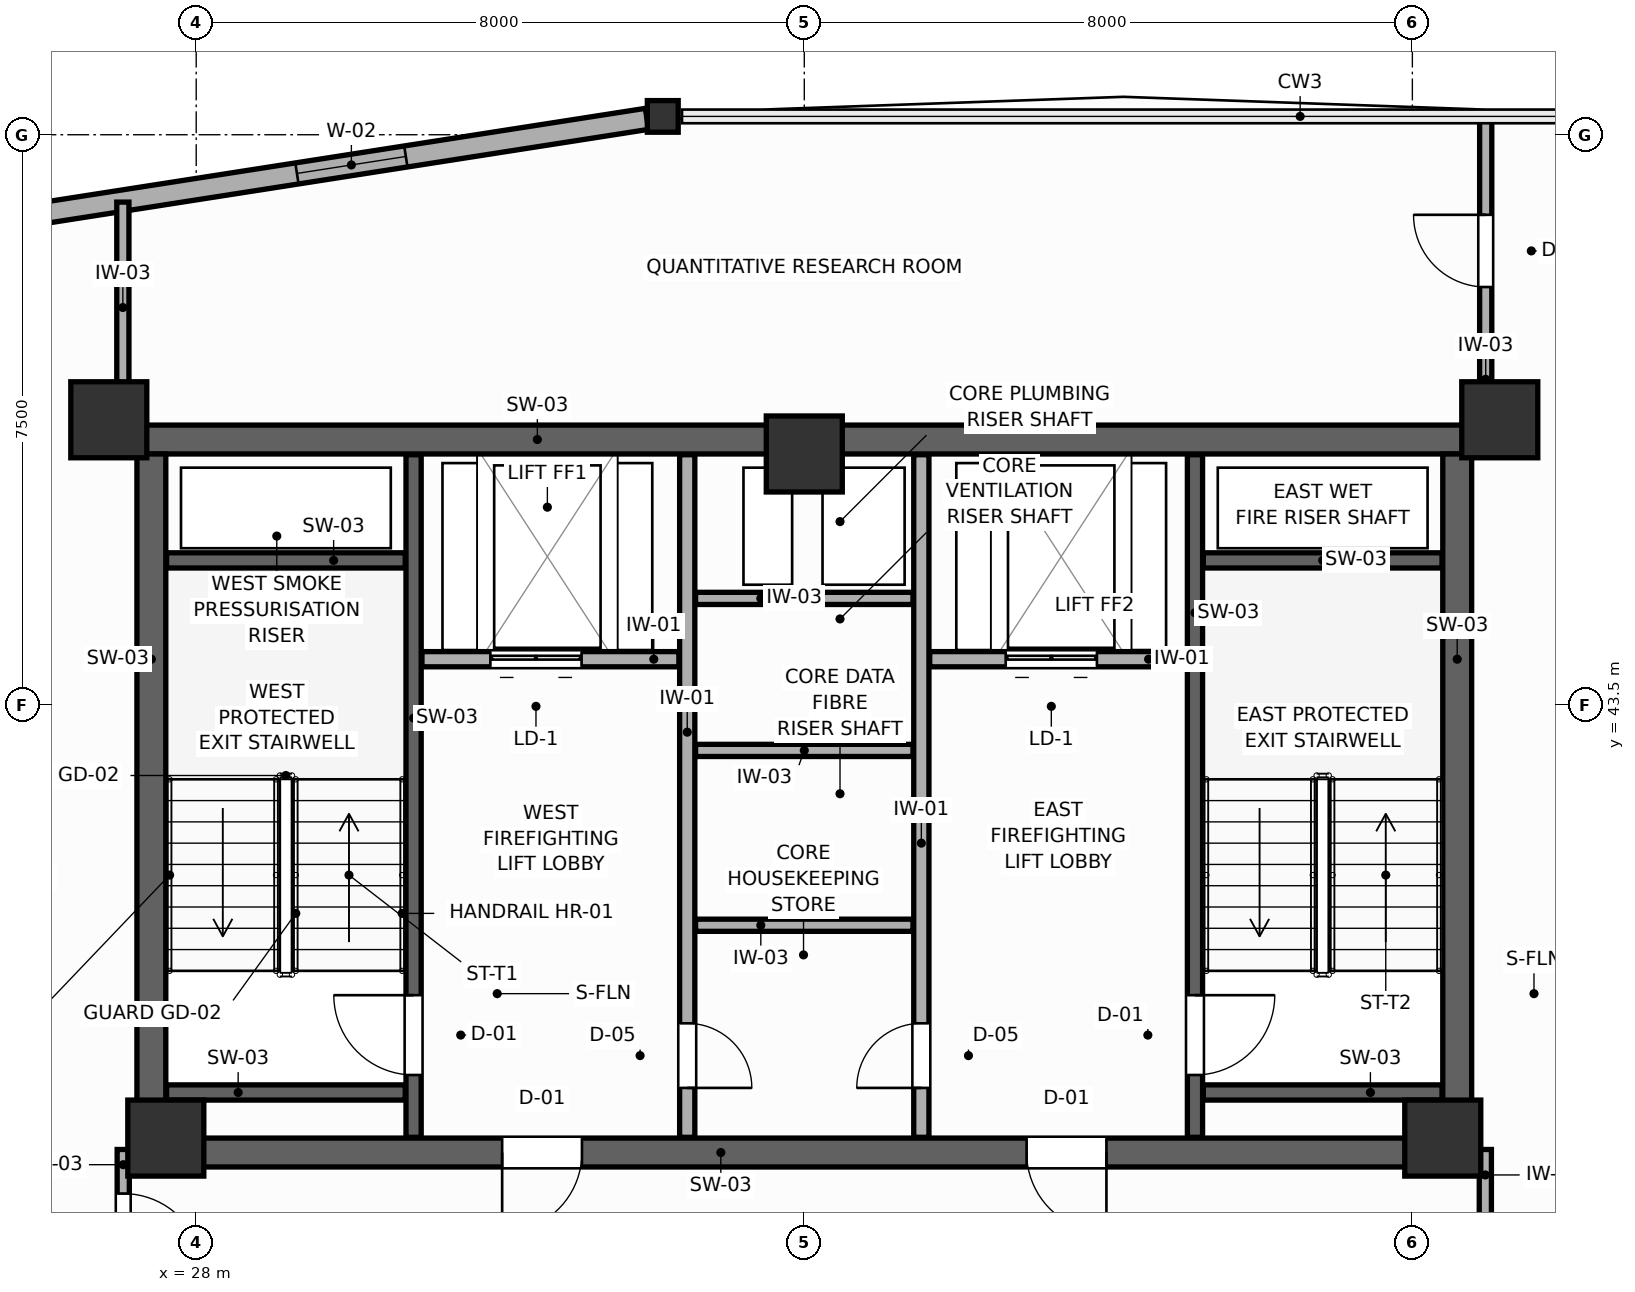
"""IFC4 building model, lengths in metres.
Left out: names, types, materials, properties, quantities, classifications, styles, units other than length and angle.
Written with IfcOpenShell. Run it as: python <this file> out.ifc"""

import sys

from ifc_helpers import new_model, si_unit, direction, frame, frame_2d, origin, origin_2d, place, context, subcontext, project, spatial, rectangle, i_section, extrude, source, transform, mapped, element, fill, save


model = new_model("IFC4")
c1 = context("Model", 3, precision=1e-05, world=origin(), true_north=direction((0.0, 1.0)))
c2 = subcontext(c1, "Body", "Model", "MODEL_VIEW")
j1 = project(units=[si_unit("LENGTHUNIT", "METRE"), si_unit("PLANEANGLEUNIT", "RADIAN")], contexts=[c1])
p1 = place(None, origin())
s1 = spatial("IfcSite", under=j1, at=p1, CompositionType="ELEMENT")
p2 = place(p1, origin())
s2 = spatial("IfcBuilding", under=s1, at=p2, CompositionType="ELEMENT")
p3 = place(p2, frame((0.0, 0.0, 234.6)))
s3 = spatial("IfcBuildingStorey", under=s2, at=p3, CompositionType="ELEMENT", Elevation=234.6)
p4 = place(p3, frame((27.22, 46.99, 0.0), z_axis=(0.0, 0.0, 1.0), x_axis=(1.0, 0.0, 0.0)))
e1 = element("IfcWall", 1, at=p4, inside=s3, PredefinedType="SHEAR", context=c2, shape_type="SweptSolid", body=[
    extrude(rectangle(XDim=17.56, YDim=0.38, at=frame_2d((8.78, 0.0))), origin(), (0.0, 0.0, 1.0), 3.6),
])
p5 = place(p3, frame((27.22, 37.61, 0.0), z_axis=(0.0, 0.0, 1.0), x_axis=(1.0, 0.0, 0.0)))
e2 = element("IfcWall", 2, at=p5, inside=s3, PredefinedType="SHEAR", context=c2, shape_type="SweptSolid", body=[
    extrude(rectangle(XDim=17.56, YDim=0.38, at=frame_2d((8.78, 0.0))), origin(), (0.0, 0.0, 1.0), 3.6),
])
p6 = place(p5, frame((4.805, 0.0, 0.0)))
e3 = element("IfcOpeningElement", 3, at=p6, cuts=e2, PredefinedType="OPENING", context=c2, shape_type="SweptSolid", body=[
    extrude(rectangle(XDim=1.05, YDim=2.1, at=frame_2d((0.525, 1.05))), frame((0.0, 0.2, 0.0), z_axis=(0.0, -1.0, 0.0), x_axis=(1.0, 0.0, 0.0)), (0.0, 0.0, 1.0), 0.4),
])
p7 = place(p5, frame((11.705, 0.0, 0.0)))
e4 = element("IfcOpeningElement", 4, at=p7, cuts=e2, PredefinedType="OPENING", context=c2, shape_type="SweptSolid", body=[
    extrude(rectangle(XDim=1.05, YDim=2.1, at=frame_2d((0.525, 1.05))), frame((0.0, 0.2, 0.0), z_axis=(0.0, -1.0, 0.0), x_axis=(1.0, 0.0, 0.0)), (0.0, 0.0, 1.0), 0.4),
])
for number, where, z_axis, x_axis in (
    (5, (27.41, 37.8, 0.0), (0.0, 0.0, 1.0), (0.0, 1.0, 0.0)),
    (6, (44.59, 37.8, 0.0), (0.0, 0.0, 1.0), (0.0, 1.0, 0.0)),
):
    element("IfcWall", number, at=place(p3, frame(where, z_axis=z_axis, x_axis=x_axis)), inside=s3, PredefinedType="SHEAR", context=c2, shape_type="SweptSolid", body=[
        extrude(rectangle(XDim=9.0, YDim=0.38, at=frame_2d((4.5, 0.0))), origin(), (0.0, 0.0, 1.0), 3.6),
    ])
m1 = source(origin(), c2, "Body", "SweptSolid", [
    extrude(rectangle(XDim=1.0, YDim=1.0, at=origin_2d()), origin(), (0.0, 0.0, 1.0), 3.6),
])
for number, where, z_axis, x_axis in (
    (7, (26.85, 47.25, 0.0), (0.0, 0.0, 1.0), (1.0, 0.0, 0.0)),
    (8, (45.15, 47.25, 0.0), (0.0, 0.0, 1.0), (1.0, 0.0, 0.0)),
    (9, (27.6, 37.8, 0.0), (0.0, 0.0, 1.0), (1.0, 0.0, 0.0)),
    (10, (44.4, 37.8, 0.0), (0.0, 0.0, 1.0), (1.0, 0.0, 0.0)),
    (11, (36.0, 46.8, 0.0), (0.0, 0.0, 1.0), (1.0, 0.0, 0.0)),
):
    element("IfcColumn", number, at=place(p3, frame(where, z_axis=z_axis, x_axis=x_axis)), inside=s3, PredefinedType="COLUMN", context=c2, shape_type="MappedRepresentation", body=[
        mapped(m1, transform((0.0, 0.0, 0.0), scale=1.0)),
    ])
m2 = source(origin(), c2, "Body", "SweptSolid", [
    extrude(i_section(OverallWidth=0.406, OverallDepth=0.416, WebThickness=0.027, FlangeThickness=0.044, FilletRadius=0.015, at=origin_2d()), origin(), (0.0, 0.0, 1.0), 3.6),
])
p8 = place(p3, frame((34.138, 51.241, 0.0), z_axis=(0.0, 0.0, 1.0), x_axis=(1.0, 0.0, 0.0)))
e12 = element("IfcColumn", 12, at=p8, inside=s3, PredefinedType="COLUMN", context=c2, shape_type="MappedRepresentation", body=[
    mapped(m2, transform((0.0, 0.0, 0.0), scale=1.0)),
])
p9 = place(p3, frame((33.93, 51.209, 0.0), z_axis=(0.0, 0.0, 1.0), x_axis=(-0.988058563106, -0.154078797613, 0.0)))
e13 = element("IfcWall", 13, at=p9, inside=s3, PredefinedType="SOLIDWALL", context=c2, shape_type="SweptSolid", body=[
    extrude(rectangle(XDim=13.492, YDim=0.28, at=frame_2d((6.746, 0.0))), origin(), (0.0, 0.0, 1.0), 2.81),
])
p10 = place(p9, frame((3.211, 0.0, 0.75)))
e14 = element("IfcOpeningElement", 14, at=p10, cuts=e13, PredefinedType="OPENING", context=c2, shape_type="SweptSolid", body=[
    extrude(rectangle(XDim=1.45, YDim=1.65, at=frame_2d((0.725, 0.825))), frame((0.0, 0.15, 0.0), z_axis=(0.0, -1.0, 0.0), x_axis=(1.0, 0.0, 0.0)), (0.0, 0.0, 1.0), 0.3),
])
p11 = place(p3, frame((30.86, 37.81, 0.0), z_axis=(0.0, 0.0, 1.0), x_axis=(0.0, 1.0, 0.0)))
e15 = element("IfcWall", 15, at=p11, inside=s3, PredefinedType="SHEAR", context=c2, shape_type="SweptSolid", body=[
    extrude(rectangle(XDim=8.98, YDim=0.2, at=frame_2d((4.49, 0.0))), origin(), (0.0, 0.0, 1.0), 3.6),
])
p12 = place(p11, frame((0.82, 0.0, 0.0)))
e16 = element("IfcOpeningElement", 16, at=p12, cuts=e15, PredefinedType="OPENING", context=c2, shape_type="SweptSolid", body=[
    extrude(rectangle(XDim=1.05, YDim=2.1, at=frame_2d((0.525, 1.05))), frame((0.0, 0.11, 0.0), z_axis=(0.0, -1.0, 0.0), x_axis=(1.0, 0.0, 0.0)), (0.0, 0.0, 1.0), 0.22),
])
for number, where, z_axis, x_axis in (
    (17, (27.61, 45.4, 0.0), (0.0, 0.0, 1.0), (1.0, 0.0, 0.0)),
    (18, (27.61, 38.4, 0.0), (0.0, 0.0, 1.0), (1.0, 0.0, 0.0)),
):
    element("IfcWall", number, at=place(p3, frame(where, z_axis=z_axis, x_axis=x_axis)), inside=s3, PredefinedType="SHEAR", context=c2, shape_type="SweptSolid", body=[
        extrude(rectangle(XDim=3.14, YDim=0.2, at=frame_2d((1.57, 0.0))), origin(), (0.0, 0.0, 1.0), 3.6),
    ])
p13 = place(p3, frame((41.14, 37.81, 0.0), z_axis=(0.0, 0.0, 1.0), x_axis=(0.0, 1.0, 0.0)))
e19 = element("IfcWall", 19, at=p13, inside=s3, PredefinedType="SHEAR", context=c2, shape_type="SweptSolid", body=[
    extrude(rectangle(XDim=8.98, YDim=0.2, at=frame_2d((4.49, 0.0))), origin(), (0.0, 0.0, 1.0), 3.6),
])
p14 = place(p13, frame((0.82, 0.0, 0.0)))
e20 = element("IfcOpeningElement", 20, at=p14, cuts=e19, PredefinedType="OPENING", context=c2, shape_type="SweptSolid", body=[
    extrude(rectangle(XDim=1.05, YDim=2.1, at=frame_2d((0.525, 1.05))), frame((0.0, 0.11, 0.0), z_axis=(0.0, -1.0, 0.0), x_axis=(1.0, 0.0, 0.0)), (0.0, 0.0, 1.0), 0.22),
])
for number, where, z_axis, x_axis in (
    (21, (41.25, 45.4, 0.0), (0.0, 0.0, 1.0), (1.0, 0.0, 0.0)),
    (22, (41.25, 38.4, 0.0), (0.0, 0.0, 1.0), (1.0, 0.0, 0.0)),
):
    element("IfcWall", number, at=place(p3, frame(where, z_axis=z_axis, x_axis=x_axis)), inside=s3, PredefinedType="SHEAR", context=c2, shape_type="SweptSolid", body=[
        extrude(rectangle(XDim=3.14, YDim=0.2, at=frame_2d((1.57, 0.0))), origin(), (0.0, 0.0, 1.0), 3.6),
    ])
p15 = place(p3, frame((30.97, 44.1, 0.0), z_axis=(0.0, 0.0, 1.0), x_axis=(1.0, 0.0, 0.0)))
e23 = element("IfcWall", 23, at=p15, inside=s3, PredefinedType="PARTITIONING", context=c2, shape_type="SweptSolid", body=[
    extrude(rectangle(XDim=3.38, YDim=0.2, at=frame_2d((1.69, 0.0))), origin(), (0.0, 0.0, 1.0), 3.26),
])
p16 = place(p15, frame((0.9, 0.0, 0.0)))
e24 = element("IfcOpeningElement", 24, at=p16, cuts=e23, PredefinedType="OPENING", context=c2, shape_type="SweptSolid", body=[
    extrude(rectangle(XDim=1.2, YDim=2.1, at=frame_2d((0.6, 1.05))), frame((0.0, 0.11, 0.0), z_axis=(0.0, -1.0, 0.0), x_axis=(1.0, 0.0, 0.0)), (0.0, 0.0, 1.0), 0.22),
])
p17 = place(p3, frame((37.65, 44.1, 0.0), z_axis=(0.0, 0.0, 1.0), x_axis=(1.0, 0.0, 0.0)))
e25 = element("IfcWall", 25, at=p17, inside=s3, PredefinedType="PARTITIONING", context=c2, shape_type="SweptSolid", body=[
    extrude(rectangle(XDim=3.38, YDim=0.2, at=frame_2d((1.69, 0.0))), origin(), (0.0, 0.0, 1.0), 3.26),
])
p18 = place(p17, frame((1.0, 0.0, 0.0)))
e26 = element("IfcOpeningElement", 26, at=p18, cuts=e25, PredefinedType="OPENING", context=c2, shape_type="SweptSolid", body=[
    extrude(rectangle(XDim=1.2, YDim=2.1, at=frame_2d((0.6, 1.05))), frame((0.0, 0.11, 0.0), z_axis=(0.0, -1.0, 0.0), x_axis=(1.0, 0.0, 0.0)), (0.0, 0.0, 1.0), 0.22),
])
p19 = place(p3, frame((34.46, 37.81, 0.0), z_axis=(0.0, 0.0, 1.0), x_axis=(0.0, 1.0, 0.0)))
e27 = element("IfcWall", 27, at=p19, inside=s3, PredefinedType="PARTITIONING", context=c2, shape_type="SweptSolid", body=[
    extrude(rectangle(XDim=8.98, YDim=0.2, at=frame_2d((4.49, 0.0))), origin(), (0.0, 0.0, 1.0), 3.26),
])
p20 = place(p19, frame((0.65, 0.0, 0.0)))
e28 = element("IfcOpeningElement", 28, at=p20, cuts=e27, PredefinedType="OPENING", context=c2, shape_type="SweptSolid", body=[
    extrude(rectangle(XDim=0.85, YDim=2.05, at=frame_2d((0.425, 1.025))), frame((0.0, 0.11, 0.0), z_axis=(0.0, -1.0, 0.0), x_axis=(1.0, 0.0, 0.0)), (0.0, 0.0, 1.0), 0.22),
])
p21 = place(p3, frame((37.54, 37.81, 0.0), z_axis=(0.0, 0.0, 1.0), x_axis=(0.0, 1.0, 0.0)))
e29 = element("IfcWall", 29, at=p21, inside=s3, PredefinedType="PARTITIONING", context=c2, shape_type="SweptSolid", body=[
    extrude(rectangle(XDim=8.98, YDim=0.2, at=frame_2d((4.49, 0.0))), origin(), (0.0, 0.0, 1.0), 3.26),
])
p22 = place(p21, frame((0.65, 0.0, 0.0)))
e30 = element("IfcOpeningElement", 30, at=p22, cuts=e29, PredefinedType="OPENING", context=c2, shape_type="SweptSolid", body=[
    extrude(rectangle(XDim=0.85, YDim=2.05, at=frame_2d((0.425, 1.025))), frame((0.0, 0.11, 0.0), z_axis=(0.0, -1.0, 0.0), x_axis=(1.0, 0.0, 0.0)), (0.0, 0.0, 1.0), 0.22),
])
for number, where, z_axis, x_axis in (
    (31, (34.57, 40.6, 0.0), (0.0, 0.0, 1.0), (1.0, 0.0, 0.0)),
    (32, (34.57, 42.9, 0.0), (0.0, 0.0, 1.0), (1.0, 0.0, 0.0)),
    (33, (34.57, 44.9, 0.0), (0.0, 0.0, 1.0), (1.0, 0.0, 0.0)),
):
    element("IfcWall", number, at=place(p3, frame(where, z_axis=z_axis, x_axis=x_axis)), inside=s3, PredefinedType="PARTITIONING", context=c2, shape_type="SweptSolid", body=[
        extrude(rectangle(XDim=2.86, YDim=0.16, at=frame_2d((1.43, 0.0))), origin(), (0.0, 0.0, 1.0), 3.26),
    ])
p23 = place(p3, frame((27.04, 35.54, 0.0), z_axis=(0.0, 0.0, 1.0), x_axis=(0.0, 1.0, 0.0)))
e34 = element("IfcWall", 34, at=p23, inside=s3, PredefinedType="PARTITIONING", context=c2, shape_type="SweptSolid", body=[
    extrude(rectangle(XDim=2.11, YDim=0.16, at=frame_2d((1.055, 0.0))), origin(), (0.0, 0.0, 1.0), 3.26),
])
p24 = place(p23, frame((0.48, 0.0, 0.0)))
e35 = element("IfcOpeningElement", 35, at=p24, cuts=e34, PredefinedType="OPENING", context=c2, shape_type="SweptSolid", body=[
    extrude(rectangle(XDim=1.05, YDim=2.1, at=frame_2d((0.525, 1.05))), frame((0.0, 0.09, 0.0), z_axis=(0.0, -1.0, 0.0), x_axis=(1.0, 0.0, 0.0)), (0.0, 0.0, 1.0), 0.18),
])
p25 = place(p3, frame((44.96, 35.0, 0.0), z_axis=(0.0, 0.0, 1.0), x_axis=(0.0, 1.0, 0.0)))
e36 = element("IfcWall", 36, at=p25, inside=s3, PredefinedType="PARTITIONING", context=c2, shape_type="SweptSolid", body=[
    extrude(rectangle(XDim=2.65, YDim=0.16, at=frame_2d((1.325, 0.0))), origin(), (0.0, 0.0, 1.0), 3.26),
])
p26 = place(p25, frame((0.75, 0.0, 0.0)))
e37 = element("IfcOpeningElement", 37, at=p26, cuts=e36, PredefinedType="OPENING", context=c2, shape_type="SweptSolid", body=[
    extrude(rectangle(XDim=1.05, YDim=2.1, at=frame_2d((0.525, 1.05))), frame((0.0, 0.09, 0.0), z_axis=(0.0, -1.0, 0.0), x_axis=(1.0, 0.0, 0.0)), (0.0, 0.0, 1.0), 0.18),
])
p27 = place(p3, frame((44.965, 47.34, 0.0), z_axis=(0.0, 0.0, 1.0), x_axis=(0.0, 1.0, 0.0)))
e38 = element("IfcWall", 38, at=p27, inside=s3, PredefinedType="PARTITIONING", context=c2, shape_type="SweptSolid", body=[
    extrude(rectangle(XDim=3.881, YDim=0.16, at=frame_2d((1.94, 0.0))), origin(), (0.0, 0.0, 1.0), 3.26),
])
p28 = place(p27, frame((1.656, 0.0, 0.0)))
e39 = element("IfcOpeningElement", 39, at=p28, cuts=e38, PredefinedType="OPENING", context=c2, shape_type="SweptSolid", body=[
    extrude(rectangle(XDim=0.95, YDim=2.05, at=frame_2d((0.475, 1.025))), frame((0.0, 0.09, 0.0), z_axis=(0.0, -1.0, 0.0), x_axis=(1.0, 0.0, 0.0)), (0.0, 0.0, 1.0), 0.18),
])
p29 = place(p3, frame((27.035, 47.34, 0.0), z_axis=(0.0, 0.0, 1.0), x_axis=(0.0, 1.0, 0.0)))
e40 = element("IfcWall", 40, at=p29, inside=s3, PredefinedType="PARTITIONING", context=c2, shape_type="SweptSolid", body=[
    extrude(rectangle(XDim=2.773, YDim=0.16, at=frame_2d((1.387, 0.0))), origin(), (0.0, 0.0, 1.0), 3.26),
])
p30 = place(p10, origin())
e41 = element("IfcWindow", 41, at=p30, inside=s3, PartitioningType="SINGLE_PANEL", PredefinedType="WINDOW", context=c2, shape_type="SweptSolid", body=[
    extrude(rectangle(XDim=1.45, YDim=1.65, at=frame_2d((0.725, 0.825))), frame((0.0, 0.03, 0.0), z_axis=(0.0, -1.0, 0.0), x_axis=(1.0, 0.0, 0.0)), (0.0, 0.0, 1.0), 0.06),
])
fill(e14, e41)
p31 = place(p12, origin())
e42 = element("IfcDoor", 42, at=p31, inside=s3, OperationType="SINGLE_SWING_RIGHT", PredefinedType="DOOR", context=c2, shape_type="SweptSolid", body=[
    extrude(rectangle(XDim=1.05, YDim=2.1, at=frame_2d((0.525, 1.05))), frame((0.0, 0.025, 0.0), z_axis=(0.0, -1.0, 0.0), x_axis=(1.0, 0.0, 0.0)), (0.0, 0.0, 1.0), 0.05),
])
fill(e16, e42)
p32 = place(p14, frame((1.05, 0.0, 0.0), z_axis=(0.0, 0.0, 1.0), x_axis=(-1.0, 0.0, 0.0)))
e43 = element("IfcDoor", 43, at=p32, inside=s3, OperationType="SINGLE_SWING_LEFT", PredefinedType="DOOR", context=c2, shape_type="SweptSolid", body=[
    extrude(rectangle(XDim=1.05, YDim=2.1, at=frame_2d((0.525, 1.05))), frame((0.0, 0.025, 0.0), z_axis=(0.0, -1.0, 0.0), x_axis=(1.0, 0.0, 0.0)), (0.0, 0.0, 1.0), 0.05),
])
fill(e20, e43)
p33 = place(p16, origin())
e44 = element("IfcDoor", 44, at=p33, inside=s3, OperationType="DOUBLE_DOOR_SLIDING", PredefinedType="DOOR", context=c2, shape_type="SweptSolid", body=[
    extrude(rectangle(XDim=1.2, YDim=2.1, at=frame_2d((0.6, 1.05))), frame((0.0, 0.025, 0.0), z_axis=(0.0, -1.0, 0.0), x_axis=(1.0, 0.0, 0.0)), (0.0, 0.0, 1.0), 0.05),
])
fill(e24, e44)
p34 = place(p18, origin())
e45 = element("IfcDoor", 45, at=p34, inside=s3, OperationType="DOUBLE_DOOR_SLIDING", PredefinedType="DOOR", context=c2, shape_type="SweptSolid", body=[
    extrude(rectangle(XDim=1.2, YDim=2.1, at=frame_2d((0.6, 1.05))), frame((0.0, 0.025, 0.0), z_axis=(0.0, -1.0, 0.0), x_axis=(1.0, 0.0, 0.0)), (0.0, 0.0, 1.0), 0.05),
])
fill(e26, e45)
p35 = place(p20, frame((0.85, 0.0, 0.0), z_axis=(0.0, 0.0, 1.0), x_axis=(-1.0, 0.0, 0.0)))
e46 = element("IfcDoor", 46, at=p35, inside=s3, OperationType="SINGLE_SWING_RIGHT", PredefinedType="DOOR", context=c2, shape_type="SweptSolid", body=[
    extrude(rectangle(XDim=0.85, YDim=2.05, at=frame_2d((0.425, 1.025))), frame((0.0, 0.025, 0.0), z_axis=(0.0, -1.0, 0.0), x_axis=(1.0, 0.0, 0.0)), (0.0, 0.0, 1.0), 0.05),
])
fill(e28, e46)
p36 = place(p22, origin())
e47 = element("IfcDoor", 47, at=p36, inside=s3, OperationType="SINGLE_SWING_LEFT", PredefinedType="DOOR", context=c2, shape_type="SweptSolid", body=[
    extrude(rectangle(XDim=0.85, YDim=2.05, at=frame_2d((0.425, 1.025))), frame((0.0, 0.025, 0.0), z_axis=(0.0, -1.0, 0.0), x_axis=(1.0, 0.0, 0.0)), (0.0, 0.0, 1.0), 0.05),
])
fill(e30, e47)
p37 = place(p24, frame((1.05, 0.0, 0.0), z_axis=(0.0, 0.0, 1.0), x_axis=(-1.0, 0.0, 0.0)))
e48 = element("IfcDoor", 48, at=p37, inside=s3, OperationType="SINGLE_SWING_RIGHT", PredefinedType="DOOR", context=c2, shape_type="SweptSolid", body=[
    extrude(rectangle(XDim=1.05, YDim=2.1, at=frame_2d((0.525, 1.05))), frame((0.0, 0.025, 0.0), z_axis=(0.0, -1.0, 0.0), x_axis=(1.0, 0.0, 0.0)), (0.0, 0.0, 1.0), 0.05),
])
fill(e35, e48)
p38 = place(p28, origin())
e49 = element("IfcDoor", 49, at=p38, inside=s3, OperationType="SINGLE_SWING_RIGHT", PredefinedType="DOOR", context=c2, shape_type="SweptSolid", body=[
    extrude(rectangle(XDim=0.95, YDim=2.05, at=frame_2d((0.475, 1.025))), frame((0.0, 0.025, 0.0), z_axis=(0.0, -1.0, 0.0), x_axis=(1.0, 0.0, 0.0)), (0.0, 0.0, 1.0), 0.05),
])
fill(e39, e49)
p39 = place(p6, frame((1.05, 0.0, 0.0), z_axis=(0.0, 0.0, 1.0), x_axis=(-1.0, 0.0, 0.0)))
e50 = element("IfcDoor", 50, at=p39, inside=s3, OperationType="SINGLE_SWING_RIGHT", PredefinedType="DOOR", context=c2, shape_type="SweptSolid", body=[
    extrude(rectangle(XDim=1.05, YDim=2.1, at=frame_2d((0.525, 1.05))), frame((0.0, 0.025, 0.0), z_axis=(0.0, -1.0, 0.0), x_axis=(1.0, 0.0, 0.0)), (0.0, 0.0, 1.0), 0.05),
])
fill(e3, e50)
p40 = place(p7, frame((1.05, 0.0, 0.0), z_axis=(0.0, 0.0, 1.0), x_axis=(-1.0, 0.0, 0.0)))
e51 = element("IfcDoor", 51, at=p40, inside=s3, OperationType="SINGLE_SWING_LEFT", PredefinedType="DOOR", context=c2, shape_type="SweptSolid", body=[
    extrude(rectangle(XDim=1.05, YDim=2.1, at=frame_2d((0.525, 1.05))), frame((0.0, 0.025, 0.0), z_axis=(0.0, -1.0, 0.0), x_axis=(1.0, 0.0, 0.0)), (0.0, 0.0, 1.0), 0.05),
])
fill(e4, e51)
save(model, sys.argv[1])
